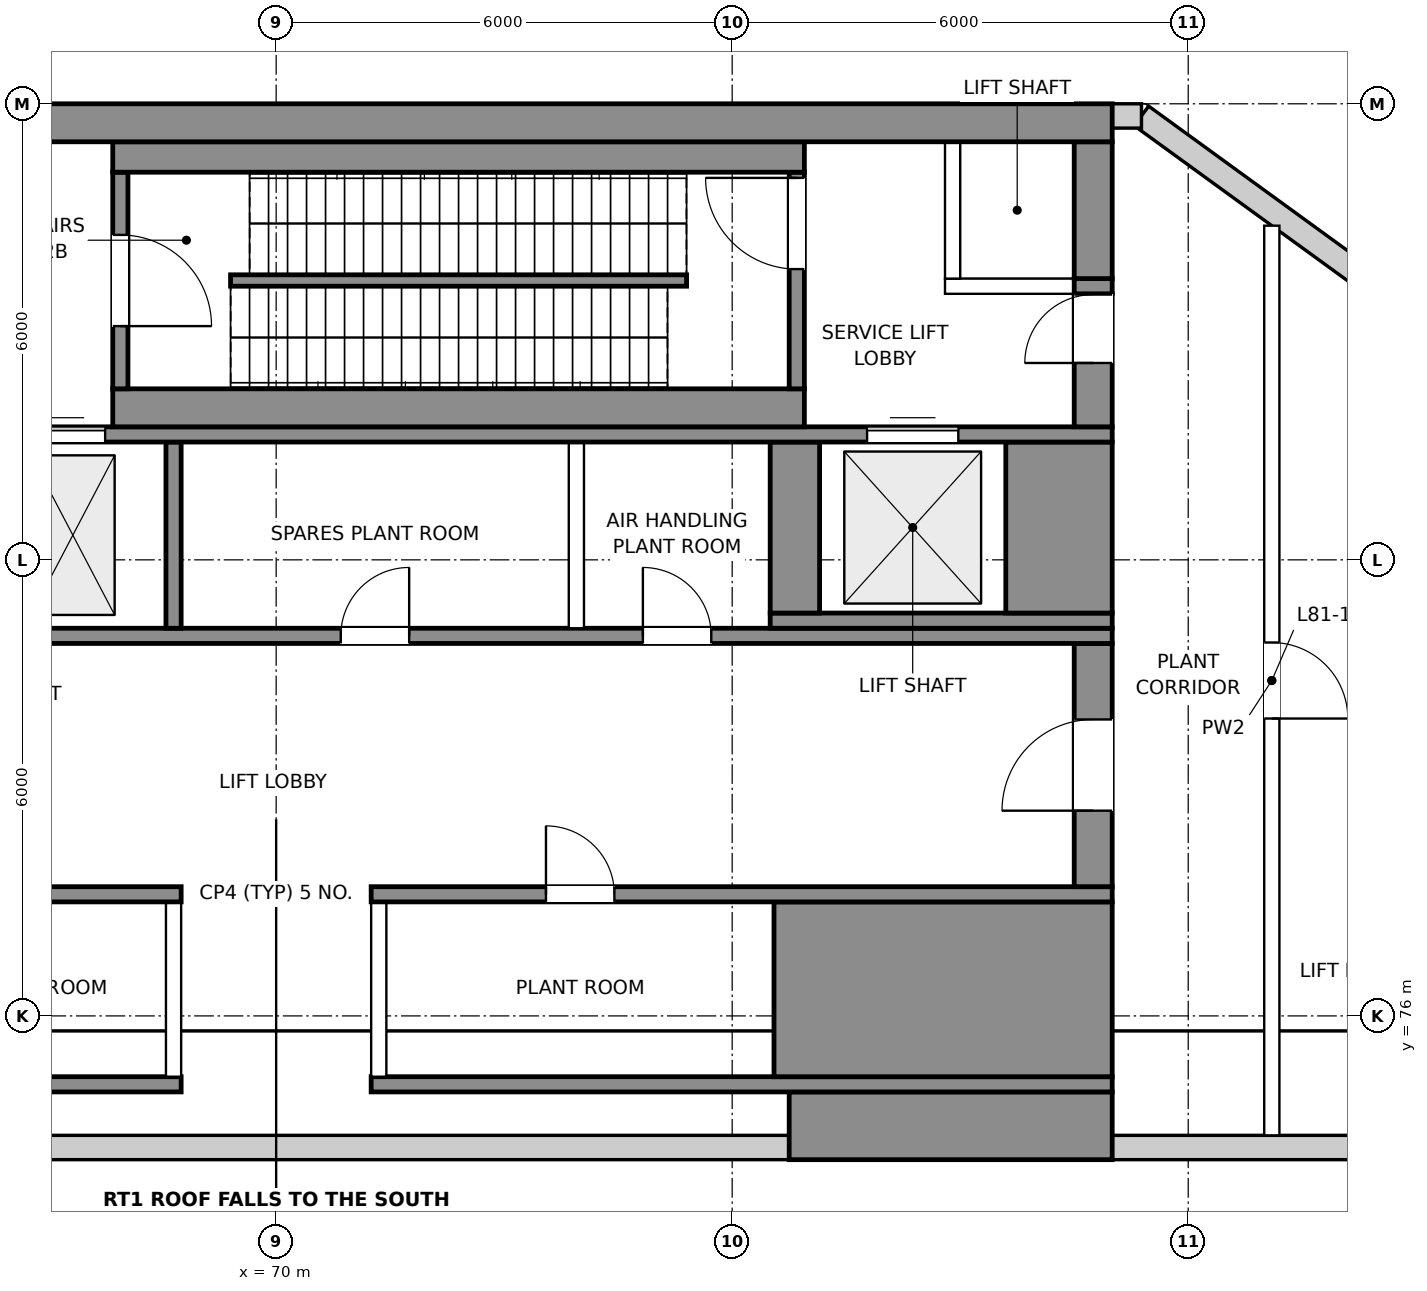
"""IFC4 building model, lengths in metres.
Left out: names, types, materials, properties, quantities, classifications, styles, units other than length and angle.
Written with IfcOpenShell. Run it as: python <this file> out.ifc"""

import sys

from ifc_helpers import new_model, si_unit, direction, frame, frame_2d, origin, place, context, subcontext, project, spatial, polyline, rectangle, outline, extrude, element, fill, save


model = new_model("IFC4")
c1 = context("Model", 3, precision=1e-05, world=origin(), true_north=direction((0.0, 1.0)))
c2 = subcontext(c1, "Body", "Model", "MODEL_VIEW")
j1 = project(units=[si_unit("LENGTHUNIT", "METRE"), si_unit("PLANEANGLEUNIT", "RADIAN")], contexts=[c1])
p1 = place(None, origin())
s1 = spatial("IfcSite", under=j1, at=p1, CompositionType="ELEMENT")
p2 = place(p1, origin())
s2 = spatial("IfcBuilding", under=s1, at=p2, CompositionType="ELEMENT")
p3 = place(p2, frame((0.0, 0.0, 346.7)))
s3 = spatial("IfcBuildingStorey", under=s2, at=p3, CompositionType="ELEMENT", Elevation=346.7)
p4 = place(p3, frame((84.74, 85.403, 0.0), z_axis=(0.0, 0.0, 1.0), x_axis=(-0.80900078054, 0.587807568074, 0.0)))
e1 = element("IfcWall", 1, at=p4, inside=s3, PredefinedType="SOLIDWALL", context=c2, shape_type="SweptSolid", body=[
    extrude(rectangle(XDim=4.147, YDim=0.32, at=frame_2d((2.073, 0.0))), origin(), (0.0, 0.0, 1.0), 4.2),
])
p5 = place(p3, frame((81.385, 87.84, 0.0), z_axis=(0.0, 0.0, 1.0), x_axis=(-1.0, 0.0, 0.0)))
e2 = element("IfcWall", 2, at=p5, inside=s3, PredefinedType="SOLIDWALL", context=c2, shape_type="SweptSolid", body=[
    extrude(rectangle(XDim=0.385, YDim=0.32, at=frame_2d((0.192, 0.0))), origin(), (0.0, 0.0, 1.0), 4.2),
])
p6 = place(p3, frame((63.25, 74.269, 0.0), z_axis=(0.0, 0.0, 1.0), x_axis=(1.0, 0.0, 0.0)))
e3 = element("IfcWall", 3, at=p6, inside=s3, PredefinedType="SOLIDWALL", context=c2, shape_type="SweptSolid", body=[
    extrude(rectangle(XDim=13.5, YDim=0.32, at=frame_2d((6.75, 0.0))), origin(), (0.0, 0.0, 1.0), 2.842),
])
p7 = place(p3, frame((81.0, 74.269, 0.0), z_axis=(0.0, 0.0, 1.0), x_axis=(1.0, 0.0, 0.0)))
e4 = element("IfcWall", 4, at=p7, inside=s3, PredefinedType="SOLIDWALL", context=c2, shape_type="SweptSolid", body=[
    extrude(rectangle(XDim=7.284, YDim=0.32, at=frame_2d((3.642, 0.0))), origin(), (0.0, 0.0, 1.0), 2.842),
])
p8 = place(p3, frame((76.75, 74.554, 0.0), z_axis=(0.0, 0.0, 1.0), x_axis=(1.0, 0.0, 0.0)))
e5 = element("IfcWall", 5, at=p8, inside=s3, PredefinedType="SHEAR", context=c2, shape_type="SweptSolid", body=[
    extrude(rectangle(XDim=4.25, YDim=0.891, at=frame_2d((2.125, 0.0))), origin(), (0.0, 0.0, 1.0), 3.045),
])
for number, where, z_axis, x_axis in (
    (6, (59.0, 75.1, 0.0), (0.0, 0.0, 1.0), (1.0, 0.0, 0.0)),
    (7, (71.25, 75.1, 0.0), (0.0, 0.0, 1.0), (1.0, 0.0, 0.0)),
):
    element("IfcWall", number, at=place(p3, frame(where, z_axis=z_axis, x_axis=x_axis)), inside=s3, PredefinedType="SHEAR", context=c2, shape_type="SweptSolid", body=[
        extrude(rectangle(XDim=9.75, YDim=0.2, at=frame_2d((4.875, 0.0))), origin(), (0.0, 0.0, 1.0), 3.528),
    ])
for number, where, z_axis, x_axis in (
    (8, (68.65, 75.2, 0.0), (0.0, 0.0, 1.0), (0.0, 1.0, 0.0)),
    (9, (71.35, 75.2, 0.0), (0.0, 0.0, 1.0), (0.0, 1.0, 0.0)),
):
    element("IfcWall", number, at=place(p3, frame(where, z_axis=z_axis, x_axis=x_axis)), inside=s3, PredefinedType="PARTITIONING", context=c2, shape_type="SweptSolid", body=[
        extrude(outline(polyline([(0.0, 0.0), (2.3, 0.0), (2.3, 4.2), (0.0, 3.516), (0.0, 0.0)])), frame((0.0, 0.1, 0.0), z_axis=(0.0, -1.0, 0.0), x_axis=(1.0, 0.0, 0.0)), (0.0, 0.0, 1.0), 0.2),
    ])
p9 = place(p3, frame((76.55, 76.35, 0.0), z_axis=(0.0, 0.0, 1.0), x_axis=(1.0, 0.0, 0.0)))
e10 = element("IfcWall", 10, at=p9, inside=s3, PredefinedType="SHEAR", context=c2, shape_type="SweptSolid", body=[
    extrude(rectangle(XDim=4.45, YDim=2.3, at=frame_2d((2.225, 0.0))), origin(), (0.0, 0.0, 1.0), 4.5),
])
p10 = place(p3, frame((59.0, 77.6, 0.0), z_axis=(0.0, 0.0, 1.0), x_axis=(1.0, 0.0, 0.0)))
e11 = element("IfcWall", 11, at=p10, inside=s3, PredefinedType="SHEAR", context=c2, shape_type="SweptSolid", body=[
    extrude(rectangle(XDim=9.75, YDim=0.2, at=frame_2d((4.875, 0.0))), origin(), (0.0, 0.0, 1.0), 4.5),
])
p11 = place(p10, frame((6.55, 0.0, 0.0)))
e12 = element("IfcOpeningElement", 12, at=p11, cuts=e11, PredefinedType="OPENING", context=c2, shape_type="SweptSolid", body=[
    extrude(rectangle(XDim=0.9, YDim=2.1, at=frame_2d((0.45, 1.05))), frame((0.0, 0.11, 0.0), z_axis=(0.0, -1.0, 0.0), x_axis=(1.0, 0.0, 0.0)), (0.0, 0.0, 1.0), 0.22),
])
p12 = place(p3, frame((71.25, 77.6, 0.0), z_axis=(0.0, 0.0, 1.0), x_axis=(1.0, 0.0, 0.0)))
e13 = element("IfcWall", 13, at=p12, inside=s3, PredefinedType="SHEAR", context=c2, shape_type="SweptSolid", body=[
    extrude(rectangle(XDim=9.75, YDim=0.2, at=frame_2d((4.875, 0.0))), origin(), (0.0, 0.0, 1.0), 4.5),
])
p13 = place(p12, frame((2.3, 0.0, 0.0)))
e14 = element("IfcOpeningElement", 14, at=p13, cuts=e13, PredefinedType="OPENING", context=c2, shape_type="SweptSolid", body=[
    extrude(rectangle(XDim=0.9, YDim=2.1, at=frame_2d((0.45, 1.05))), frame((0.0, 0.11, 0.0), z_axis=(0.0, -1.0, 0.0), x_axis=(1.0, 0.0, 0.0)), (0.0, 0.0, 1.0), 0.22),
])
p14 = place(p3, frame((80.75, 77.7, 0.0), z_axis=(0.0, 0.0, 1.0), x_axis=(0.0, 1.0, 0.0)))
e15 = element("IfcWall", 15, at=p14, inside=s3, PredefinedType="SHEAR", context=c2, shape_type="SweptSolid", body=[
    extrude(rectangle(XDim=3.2, YDim=0.5, at=frame_2d((1.6, 0.0))), origin(), (0.0, 0.0, 1.0), 4.5),
])
p15 = place(p14, frame((1.0, 0.0, 0.0)))
e16 = element("IfcOpeningElement", 16, at=p15, cuts=e15, PredefinedType="OPENING", context=c2, shape_type="SweptSolid", body=[
    extrude(rectangle(XDim=1.2, YDim=2.1, at=frame_2d((0.6, 1.05))), frame((0.0, 0.26, 0.0), z_axis=(0.0, -1.0, 0.0), x_axis=(1.0, 0.0, 0.0)), (0.0, 0.0, 1.0), 0.52),
])
p16 = place(p3, frame((59.0, 81.0, 0.0), z_axis=(0.0, 0.0, 1.0), x_axis=(1.0, 0.0, 0.0)))
e17 = element("IfcWall", 17, at=p16, inside=s3, PredefinedType="SHEAR", context=c2, shape_type="SweptSolid", body=[
    extrude(rectangle(XDim=22.0, YDim=0.2, at=frame_2d((11.0, 0.0))), origin(), (0.0, 0.0, 1.0), 4.5),
])
p17 = place(p16, frame((11.85, 0.0, 0.0)))
e18 = element("IfcOpeningElement", 18, at=p17, cuts=e17, PredefinedType="OPENING", context=c2, shape_type="SweptSolid", body=[
    extrude(rectangle(XDim=0.9, YDim=2.1, at=frame_2d((0.45, 1.05))), frame((0.0, 0.11, 0.0), z_axis=(0.0, -1.0, 0.0), x_axis=(1.0, 0.0, 0.0)), (0.0, 0.0, 1.0), 0.22),
])
p18 = place(p16, frame((15.825, 0.0, 0.0)))
e19 = element("IfcOpeningElement", 19, at=p18, cuts=e17, PredefinedType="OPENING", context=c2, shape_type="SweptSolid", body=[
    extrude(rectangle(XDim=0.9, YDim=2.1, at=frame_2d((0.45, 1.05))), frame((0.0, 0.11, 0.0), z_axis=(0.0, -1.0, 0.0), x_axis=(1.0, 0.0, 0.0)), (0.0, 0.0, 1.0), 0.22),
])
p19 = place(p3, frame((68.65, 81.1, 0.0), z_axis=(0.0, 0.0, 1.0), x_axis=(0.0, 1.0, 0.0)))
e20 = element("IfcWall", 20, at=p19, inside=s3, PredefinedType="SHEAR", context=c2, shape_type="SweptSolid", body=[
    extrude(rectangle(XDim=2.45, YDim=0.2, at=frame_2d((1.225, 0.0))), origin(), (0.0, 0.0, 1.0), 4.5),
])
p20 = place(p3, frame((73.95, 81.1, 0.0), z_axis=(0.0, 0.0, 1.0), x_axis=(0.0, 1.0, 0.0)))
e21 = element("IfcWall", 21, at=p20, inside=s3, PredefinedType="PARTITIONING", context=c2, shape_type="SweptSolid", body=[
    extrude(rectangle(XDim=2.45, YDim=0.2, at=frame_2d((1.225, 0.0))), origin(), (0.0, 0.0, 1.0), 4.2),
])
p21 = place(p3, frame((76.5, 81.2, 0.0), z_axis=(0.0, 0.0, 1.0), x_axis=(1.0, 0.0, 0.0)))
e22 = element("IfcWall", 22, at=p21, inside=s3, PredefinedType="SHEAR", context=c2, shape_type="SweptSolid", body=[
    extrude(rectangle(XDim=4.5, YDim=0.2, at=frame_2d((2.25, 0.0))), origin(), (0.0, 0.0, 1.0), 4.5),
])
p22 = place(p3, frame((76.825, 81.3, 0.0), z_axis=(0.0, 0.0, 1.0), x_axis=(0.0, 1.0, 0.0)))
e23 = element("IfcWall", 23, at=p22, inside=s3, PredefinedType="SHEAR", context=c2, shape_type="SweptSolid", body=[
    extrude(rectangle(XDim=2.25, YDim=0.65, at=frame_2d((1.125, 0.0))), origin(), (0.0, 0.0, 1.0), 4.5),
])
p23 = place(p3, frame((80.3, 81.3, 0.0), z_axis=(0.0, 0.0, 1.0), x_axis=(0.0, 1.0, 0.0)))
e24 = element("IfcWall", 24, at=p23, inside=s3, PredefinedType="SHEAR", context=c2, shape_type="SweptSolid", body=[
    extrude(rectangle(XDim=2.25, YDim=1.4, at=frame_2d((1.125, 0.0))), origin(), (0.0, 0.0, 1.0), 4.5),
])
p24 = place(p3, frame((59.0, 83.65, 0.0), z_axis=(0.0, 0.0, 1.0), x_axis=(1.0, 0.0, 0.0)))
e25 = element("IfcWall", 25, at=p24, inside=s3, PredefinedType="SHEAR", context=c2, shape_type="SweptSolid", body=[
    extrude(rectangle(XDim=22.0, YDim=0.2, at=frame_2d((11.0, 0.0))), origin(), (0.0, 0.0, 1.0), 4.5),
])
p25 = place(p24, frame((5.125, 0.0, 0.0)))
e26 = element("IfcOpeningElement", 26, at=p25, cuts=e25, PredefinedType="OPENING", context=c2, shape_type="SweptSolid", body=[
    extrude(rectangle(XDim=1.1, YDim=2.1, at=frame_2d((0.55, 1.05))), frame((0.0, 0.11, 0.0), z_axis=(0.0, -1.0, 0.0), x_axis=(1.0, 0.0, 0.0)), (0.0, 0.0, 1.0), 0.22),
])
p26 = place(p24, frame((7.65, 0.0, 0.0)))
e27 = element("IfcOpeningElement", 27, at=p26, cuts=e25, PredefinedType="OPENING", context=c2, shape_type="SweptSolid", body=[
    extrude(rectangle(XDim=1.1, YDim=2.1, at=frame_2d((0.55, 1.05))), frame((0.0, 0.11, 0.0), z_axis=(0.0, -1.0, 0.0), x_axis=(1.0, 0.0, 0.0)), (0.0, 0.0, 1.0), 0.22),
])
p27 = place(p24, frame((18.775, 0.0, 0.0)))
e28 = element("IfcOpeningElement", 28, at=p27, cuts=e25, PredefinedType="OPENING", context=c2, shape_type="SweptSolid", body=[
    extrude(rectangle(XDim=1.2, YDim=2.1, at=frame_2d((0.6, 1.05))), frame((0.0, 0.11, 0.0), z_axis=(0.0, -1.0, 0.0), x_axis=(1.0, 0.0, 0.0)), (0.0, 0.0, 1.0), 0.22),
])
p28 = place(p24, frame((2.075, 0.0, 0.0)))
e29 = element("IfcOpeningElement", 29, at=p28, cuts=e25, PredefinedType="OPENING", context=c2, shape_type="SweptSolid", body=[
    extrude(rectangle(XDim=1.1, YDim=2.1, at=frame_2d((0.55, 1.05))), frame((0.0, 0.11, 0.0), z_axis=(0.0, -1.0, 0.0), x_axis=(1.0, 0.0, 0.0)), (0.0, 0.0, 1.0), 0.22),
])
p29 = place(p3, frame((67.85, 84.0, 0.0), z_axis=(0.0, 0.0, 1.0), x_axis=(1.0, 0.0, 0.0)))
e30 = element("IfcWall", 30, at=p29, inside=s3, PredefinedType="SHEAR", context=c2, shape_type="SweptSolid", body=[
    extrude(rectangle(XDim=9.1, YDim=0.5, at=frame_2d((4.55, 0.0))), origin(), (0.0, 0.0, 1.0), 4.5),
])
p30 = place(p3, frame((80.75, 83.75, 0.0), z_axis=(0.0, 0.0, 1.0), x_axis=(0.0, 1.0, 0.0)))
e31 = element("IfcWall", 31, at=p30, inside=s3, PredefinedType="SHEAR", context=c2, shape_type="SweptSolid", body=[
    extrude(rectangle(XDim=1.75, YDim=0.5, at=frame_2d((0.875, 0.0))), origin(), (0.0, 0.0, 1.0), 4.5),
])
p31 = place(p30, frame((0.84, 0.0, 0.0)))
e32 = element("IfcOpeningElement", 32, at=p31, cuts=e31, PredefinedType="OPENING", context=c2, shape_type="SweptSolid", body=[
    extrude(rectangle(XDim=0.9, YDim=2.1, at=frame_2d((0.45, 1.05))), frame((0.0, 0.26, 0.0), z_axis=(0.0, -1.0, 0.0), x_axis=(1.0, 0.0, 0.0)), (0.0, 0.0, 1.0), 0.52),
])
p32 = place(p3, frame((67.95, 84.25, 0.0), z_axis=(0.0, 0.0, 1.0), x_axis=(0.0, 1.0, 0.0)))
e33 = element("IfcWall", 33, at=p32, inside=s3, PredefinedType="SHEAR", context=c2, shape_type="SweptSolid", body=[
    extrude(rectangle(XDim=2.85, YDim=0.2, at=frame_2d((1.425, 0.0))), origin(), (0.0, 0.0, 1.0), 4.5),
])
p33 = place(p32, frame((0.825, 0.0, 0.0)))
e34 = element("IfcOpeningElement", 34, at=p33, cuts=e33, PredefinedType="OPENING", context=c2, shape_type="SweptSolid", body=[
    extrude(rectangle(XDim=1.2, YDim=2.1, at=frame_2d((0.6, 1.05))), frame((0.0, 0.11, 0.0), z_axis=(0.0, -1.0, 0.0), x_axis=(1.0, 0.0, 0.0)), (0.0, 0.0, 1.0), 0.22),
])
p34 = place(p3, frame((76.85, 84.25, 0.0), z_axis=(0.0, 0.0, 1.0), x_axis=(0.0, 1.0, 0.0)))
e35 = element("IfcWall", 35, at=p34, inside=s3, PredefinedType="SHEAR", context=c2, shape_type="SweptSolid", body=[
    extrude(rectangle(XDim=2.85, YDim=0.2, at=frame_2d((1.425, 0.0))), origin(), (0.0, 0.0, 1.0), 4.5),
])
p35 = place(p34, frame((1.575, 0.0, 0.0)))
e36 = element("IfcOpeningElement", 36, at=p35, cuts=e35, PredefinedType="OPENING", context=c2, shape_type="SweptSolid", body=[
    extrude(rectangle(XDim=1.2, YDim=2.1, at=frame_2d((0.6, 1.05))), frame((0.0, 0.11, 0.0), z_axis=(0.0, -1.0, 0.0), x_axis=(1.0, 0.0, 0.0)), (0.0, 0.0, 1.0), 0.22),
])
p36 = place(p3, frame((78.8, 85.6, 0.0), z_axis=(0.0, 0.0, 1.0), x_axis=(1.0, 0.0, 0.0)))
e37 = element("IfcWall", 37, at=p36, inside=s3, PredefinedType="PARTITIONING", context=c2, shape_type="SweptSolid", body=[
    extrude(rectangle(XDim=1.7, YDim=0.2, at=frame_2d((0.85, 0.0))), origin(), (0.0, 0.0, 1.0), 4.2),
])
p37 = place(p3, frame((80.5, 85.6, 0.0), z_axis=(0.0, 0.0, 1.0), x_axis=(1.0, 0.0, 0.0)))
e38 = element("IfcWall", 38, at=p37, inside=s3, PredefinedType="SHEAR", context=c2, shape_type="SweptSolid", body=[
    extrude(rectangle(XDim=0.5, YDim=0.2, at=frame_2d((0.25, 0.0))), origin(), (0.0, 0.0, 1.0), 4.5),
])
p38 = place(p3, frame((78.9, 85.7, 0.0), z_axis=(0.0, 0.0, 1.0), x_axis=(0.0, 1.0, 0.0)))
e39 = element("IfcWall", 39, at=p38, inside=s3, PredefinedType="PARTITIONING", context=c2, shape_type="SweptSolid", body=[
    extrude(rectangle(XDim=1.8, YDim=0.2, at=frame_2d((0.9, 0.0))), origin(), (0.0, 0.0, 1.0), 4.2),
])
p39 = place(p3, frame((80.75, 85.7, 0.0), z_axis=(0.0, 0.0, 1.0), x_axis=(0.0, 1.0, 0.0)))
e40 = element("IfcWall", 40, at=p39, inside=s3, PredefinedType="SHEAR", context=c2, shape_type="SweptSolid", body=[
    extrude(rectangle(XDim=1.8, YDim=0.5, at=frame_2d((0.9, 0.0))), origin(), (0.0, 0.0, 1.0), 4.5),
])
p40 = place(p3, frame((67.85, 87.3, 0.0), z_axis=(0.0, 0.0, 1.0), x_axis=(1.0, 0.0, 0.0)))
e41 = element("IfcWall", 41, at=p40, inside=s3, PredefinedType="SHEAR", context=c2, shape_type="SweptSolid", body=[
    extrude(rectangle(XDim=9.1, YDim=0.4, at=frame_2d((4.55, 0.0))), origin(), (0.0, 0.0, 1.0), 4.5),
])
p41 = place(p3, frame((59.0, 87.75, 0.0), z_axis=(0.0, 0.0, 1.0), x_axis=(1.0, 0.0, 0.0)))
e42 = element("IfcWall", 42, at=p41, inside=s3, PredefinedType="SHEAR", context=c2, shape_type="SweptSolid", body=[
    extrude(rectangle(XDim=22.0, YDim=0.5, at=frame_2d((11.0, 0.0))), origin(), (0.0, 0.0, 1.0), 4.5),
])
p42 = place(p3, frame((69.4, 85.675, 0.0), z_axis=(0.0, 0.0, 1.0), x_axis=(1.0, 0.0, 0.0)))
e43 = element("IfcWall", 43, at=p42, inside=s3, PredefinedType="SHEAR", context=c2, shape_type="SweptSolid", body=[
    extrude(rectangle(XDim=6.0, YDim=0.15, at=frame_2d((3.0, 0.0))), origin(), (0.0, 0.0, 1.0), 4.5),
])
p43 = place(p3, frame((83.1, 86.396, 0.0), z_axis=(0.0, 0.0, 1.0), x_axis=(0.0, -1.0, 0.0)))
e44 = element("IfcWall", 44, at=p43, inside=s3, PredefinedType="PARTITIONING", context=c2, shape_type="SweptSolid", body=[
    extrude(outline(polyline([(0.0, 0.0), (11.968, 0.0), (11.968, 2.833), (0.0, 3.75), (0.0, 0.0)])), frame((0.0, 0.1, 0.0), z_axis=(0.0, -1.0, 0.0), x_axis=(1.0, 0.0, 0.0)), (0.0, 0.0, 1.0), 0.2),
])
p44 = place(p43, frame((5.484, 0.0, 0.0)))
e45 = element("IfcOpeningElement", 45, at=p44, cuts=e44, PredefinedType="OPENING", context=c2, shape_type="SweptSolid", body=[
    extrude(rectangle(XDim=1.0, YDim=2.1, at=frame_2d((0.5, 1.05))), frame((0.0, 0.11, 0.0), z_axis=(0.0, -1.0, 0.0), x_axis=(1.0, 0.0, 0.0)), (0.0, 0.0, 1.0), 0.22),
])
p45 = place(p33, frame((1.2, 0.0, 0.0), z_axis=(0.0, 0.0, 1.0), x_axis=(-1.0, 0.0, 0.0)))
e46 = element("IfcDoor", 46, at=p45, inside=s3, OperationType="SINGLE_SWING_RIGHT", PredefinedType="DOOR", context=c2, shape_type="SweptSolid", body=[
    extrude(rectangle(XDim=1.2, YDim=2.1, at=frame_2d((0.6, 1.05))), frame((0.0, 0.025, 0.0), z_axis=(0.0, -1.0, 0.0), x_axis=(1.0, 0.0, 0.0)), (0.0, 0.0, 1.0), 0.05),
])
fill(e34, e46)
p46 = place(p35, origin())
e47 = element("IfcDoor", 47, at=p46, inside=s3, OperationType="SINGLE_SWING_RIGHT", PredefinedType="DOOR", context=c2, shape_type="SweptSolid", body=[
    extrude(rectangle(XDim=1.2, YDim=2.1, at=frame_2d((0.6, 1.05))), frame((0.0, 0.025, 0.0), z_axis=(0.0, -1.0, 0.0), x_axis=(1.0, 0.0, 0.0)), (0.0, 0.0, 1.0), 0.05),
])
fill(e36, e47)
p47 = place(p15, origin())
e48 = element("IfcDoor", 48, at=p47, inside=s3, OperationType="SINGLE_SWING_LEFT", PredefinedType="DOOR", context=c2, shape_type="SweptSolid", body=[
    extrude(rectangle(XDim=1.2, YDim=2.1, at=frame_2d((0.6, 1.05))), frame((0.0, 0.025, 0.0), z_axis=(0.0, -1.0, 0.0), x_axis=(1.0, 0.0, 0.0)), (0.0, 0.0, 1.0), 0.05),
])
fill(e16, e48)
p48 = place(p31, origin())
e49 = element("IfcDoor", 49, at=p48, inside=s3, OperationType="SINGLE_SWING_LEFT", PredefinedType="DOOR", context=c2, shape_type="SweptSolid", body=[
    extrude(rectangle(XDim=0.9, YDim=2.1, at=frame_2d((0.45, 1.05))), frame((0.0, 0.025, 0.0), z_axis=(0.0, -1.0, 0.0), x_axis=(1.0, 0.0, 0.0)), (0.0, 0.0, 1.0), 0.05),
])
fill(e32, e49)
p49 = place(p26, origin())
e50 = element("IfcDoor", 50, at=p49, inside=s3, OperationType="DOUBLE_DOOR_SLIDING", PredefinedType="DOOR", context=c2, shape_type="SweptSolid", body=[
    extrude(rectangle(XDim=1.1, YDim=2.1, at=frame_2d((0.55, 1.05))), frame((0.0, 0.025, 0.0), z_axis=(0.0, -1.0, 0.0), x_axis=(1.0, 0.0, 0.0)), (0.0, 0.0, 1.0), 0.05),
])
fill(e27, e50)
p50 = place(p27, origin())
e51 = element("IfcDoor", 51, at=p50, inside=s3, OperationType="DOUBLE_DOOR_SLIDING", PredefinedType="DOOR", context=c2, shape_type="SweptSolid", body=[
    extrude(rectangle(XDim=1.2, YDim=2.1, at=frame_2d((0.6, 1.05))), frame((0.0, 0.025, 0.0), z_axis=(0.0, -1.0, 0.0), x_axis=(1.0, 0.0, 0.0)), (0.0, 0.0, 1.0), 0.05),
])
fill(e28, e51)
p51 = place(p13, origin())
e52 = element("IfcDoor", 52, at=p51, inside=s3, OperationType="SINGLE_SWING_LEFT", PredefinedType="DOOR", context=c2, shape_type="SweptSolid", body=[
    extrude(rectangle(XDim=0.9, YDim=2.1, at=frame_2d((0.45, 1.05))), frame((0.0, 0.025, 0.0), z_axis=(0.0, -1.0, 0.0), x_axis=(1.0, 0.0, 0.0)), (0.0, 0.0, 1.0), 0.05),
])
fill(e14, e52)
p52 = place(p17, origin())
e53 = element("IfcDoor", 53, at=p52, inside=s3, OperationType="SINGLE_SWING_RIGHT", PredefinedType="DOOR", context=c2, shape_type="SweptSolid", body=[
    extrude(rectangle(XDim=0.9, YDim=2.1, at=frame_2d((0.45, 1.05))), frame((0.0, 0.025, 0.0), z_axis=(0.0, -1.0, 0.0), x_axis=(1.0, 0.0, 0.0)), (0.0, 0.0, 1.0), 0.05),
])
fill(e18, e53)
p53 = place(p18, origin())
e54 = element("IfcDoor", 54, at=p53, inside=s3, OperationType="SINGLE_SWING_LEFT", PredefinedType="DOOR", context=c2, shape_type="SweptSolid", body=[
    extrude(rectangle(XDim=0.9, YDim=2.1, at=frame_2d((0.45, 1.05))), frame((0.0, 0.025, 0.0), z_axis=(0.0, -1.0, 0.0), x_axis=(1.0, 0.0, 0.0)), (0.0, 0.0, 1.0), 0.05),
])
fill(e19, e54)
p54 = place(p44, origin())
e55 = element("IfcDoor", 55, at=p54, inside=s3, OperationType="SINGLE_SWING_RIGHT", PredefinedType="DOOR", context=c2, shape_type="SweptSolid", body=[
    extrude(rectangle(XDim=1.0, YDim=2.1, at=frame_2d((0.5, 1.05))), frame((0.0, 0.025, 0.0), z_axis=(0.0, -1.0, 0.0), x_axis=(1.0, 0.0, 0.0)), (0.0, 0.0, 1.0), 0.05),
])
fill(e45, e55)
save(model, sys.argv[1])
